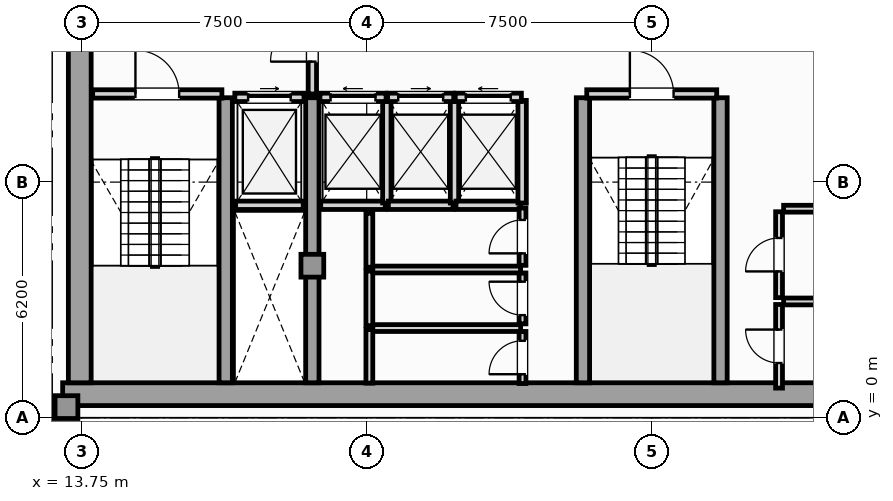
"""IFC4 building model, lengths in metres.
Left out: names, types, materials, properties, quantities, classifications, styles, units other than length and angle.
Written with IfcOpenShell. Run it as: python <this file> out.ifc"""

import sys

from ifc_helpers import new_model, si_unit, direction, frame, frame_2d, origin, origin_2d, place, context, subcontext, project, spatial, rectangle, extrude, element, fill, save


model = new_model("IFC4")
c1 = context("Model", 3, precision=1e-05, world=origin(), true_north=direction((0.0, 1.0)))
c2 = subcontext(c1, "Body", "Model", "MODEL_VIEW")
j1 = project(units=[si_unit("LENGTHUNIT", "METRE"), si_unit("PLANEANGLEUNIT", "RADIAN")], contexts=[c1])
p1 = place(None, origin())
s1 = spatial("IfcSite", under=j1, at=p1, CompositionType="ELEMENT")
p2 = place(p1, origin())
s2 = spatial("IfcBuilding", under=s1, at=p2, CompositionType="ELEMENT")
p3 = place(p2, frame((0.0, 0.0, 268.3)))
s3 = spatial("IfcBuildingStorey", under=s2, at=p3, CompositionType="ELEMENT", Elevation=268.3)
p4 = place(p3, frame((13.25, 0.62, 0.0), z_axis=(0.0, 0.0, 1.0), x_axis=(1.0, 0.0, 0.0)))
e1 = element("IfcWall", 1, at=p4, inside=s3, PredefinedType="SHEAR", context=c2, shape_type="SweptSolid", body=[
    extrude(rectangle(XDim=31.0, YDim=0.6, at=frame_2d((15.5, 0.0))), origin(), (0.0, 0.0, 1.0), 3.65),
])
p5 = place(p3, frame((13.7, 0.92, 0.0), z_axis=(0.0, 0.0, 1.0), x_axis=(0.0, 1.0, 0.0)))
e2 = element("IfcWall", 2, at=p5, inside=s3, PredefinedType="SHEAR", context=c2, shape_type="SweptSolid", body=[
    extrude(rectangle(XDim=10.53, YDim=0.6, at=frame_2d((5.265, 0.0))), origin(), (0.0, 0.0, 1.0), 3.65),
])
for number, where, z_axis, x_axis in (
    (3, (17.54, 0.92, 0.0), (0.0, 0.0, 1.0), (0.0, 1.0, 0.0)),
    (4, (19.82, 0.92, 0.0), (0.0, 0.0, 1.0), (0.0, 1.0, 0.0)),
    (5, (26.94, 0.92, 0.0), (0.0, 0.0, 1.0), (0.0, 1.0, 0.0)),
    (6, (30.56, 0.92, 0.0), (0.0, 0.0, 1.0), (0.0, 1.0, 0.0)),
):
    element("IfcWall", number, at=place(p3, frame(where, z_axis=z_axis, x_axis=x_axis)), inside=s3, PredefinedType="SHEAR", context=c2, shape_type="SweptSolid", body=[
        extrude(rectangle(XDim=7.5, YDim=0.35, at=frame_2d((3.75, 0.0))), origin(), (0.0, 0.0, 1.0), 3.65),
    ])
for number, where, z_axis, x_axis in (
    (7, (13.35, 0.28, 0.0), (0.0, 0.0, 1.0), (1.0, 0.0, 0.0)),
    (8, (19.82, 4.0, 0.0), (0.0, 0.0, 1.0), (1.0, 0.0, 0.0)),
):
    element("IfcColumn", number, at=place(p3, frame(where, z_axis=z_axis, x_axis=x_axis)), inside=s3, PredefinedType="COLUMN", context=c2, shape_type="SweptSolid", body=[
        extrude(rectangle(XDim=0.6, YDim=0.6, at=origin_2d()), origin(), (0.0, 0.0, 1.0), 3.85),
    ])
p6 = place(p3, frame((11.38, 0.18, 0.0), z_axis=(0.0, 0.0, 1.0), x_axis=(1.0, 0.0, 0.0)))
e9 = element("IfcWall", 9, at=p6, inside=s3, PredefinedType="SOLIDWALL", context=c2, shape_type="SweptSolid", body=[
    extrude(rectangle(XDim=1.87, YDim=0.26, at=frame_2d((0.935, 0.0))), origin(), (0.0, 0.0, 1.0), 3.65),
])
p7 = place(p3, frame((17.8, 5.59, 0.0), z_axis=(0.0, 0.0, 1.0), x_axis=(1.0, 0.0, 0.0)))
e10 = element("IfcWall", 10, at=p7, inside=s3, PredefinedType="SOLIDWALL", context=c2, shape_type="SweptSolid", body=[
    extrude(rectangle(XDim=1.78, YDim=0.22, at=frame_2d((0.89, 0.0))), origin(), (0.0, 0.0, 1.0), 3.65),
])
p8 = place(p3, frame((17.78, 8.43, 0.0), z_axis=(0.0, 0.0, 1.0), x_axis=(1.0, 0.0, 0.0)))
e11 = element("IfcWall", 11, at=p8, inside=s3, PredefinedType="SOLIDWALL", context=c2, shape_type="SweptSolid", body=[
    extrude(rectangle(XDim=1.82, YDim=0.22, at=frame_2d((0.91, 0.0))), origin(), (0.0, 0.0, 1.0), 3.65),
])
p9 = place(p8, frame((0.35, 0.0, 0.0)))
e12 = element("IfcOpeningElement", 12, at=p9, cuts=e11, PredefinedType="OPENING", context=c2, shape_type="SweptSolid", body=[
    extrude(rectangle(XDim=1.12, YDim=2.25, at=frame_2d((0.56, 1.125))), frame((0.0, 0.12, 0.0), z_axis=(0.0, -1.0, 0.0), x_axis=(1.0, 0.0, 0.0)), (0.0, 0.0, 1.0), 0.24),
])
p10 = place(p3, frame((20.04, 5.59, 0.0), z_axis=(0.0, 0.0, 1.0), x_axis=(1.0, 0.0, 0.0)))
e13 = element("IfcWall", 13, at=p10, inside=s3, PredefinedType="SOLIDWALL", context=c2, shape_type="SweptSolid", body=[
    extrude(rectangle(XDim=1.7, YDim=0.22, at=frame_2d((0.85, 0.0))), origin(), (0.0, 0.0, 1.0), 3.65),
])
p11 = place(p3, frame((21.78, 5.65, 0.0), z_axis=(0.0, 0.0, 1.0), x_axis=(0.0, 1.0, 0.0)))
e14 = element("IfcWall", 14, at=p11, inside=s3, PredefinedType="SOLIDWALL", context=c2, shape_type="SweptSolid", body=[
    extrude(rectangle(XDim=2.7, YDim=0.22, at=frame_2d((1.35, 0.0))), origin(), (0.0, 0.0, 1.0), 3.65),
])
p12 = place(p3, frame((20.02, 8.43, 0.0), z_axis=(0.0, 0.0, 1.0), x_axis=(1.0, 0.0, 0.0)))
e15 = element("IfcWall", 15, at=p12, inside=s3, PredefinedType="SOLIDWALL", context=c2, shape_type="SweptSolid", body=[
    extrude(rectangle(XDim=1.74, YDim=0.22, at=frame_2d((0.87, 0.0))), origin(), (0.0, 0.0, 1.0), 3.65),
])
p13 = place(p12, frame((0.28, 0.0, 0.0)))
e16 = element("IfcOpeningElement", 16, at=p13, cuts=e15, PredefinedType="OPENING", context=c2, shape_type="SweptSolid", body=[
    extrude(rectangle(XDim=1.18, YDim=2.2, at=frame_2d((0.59, 1.1))), frame((0.0, 0.12, 0.0), z_axis=(0.0, -1.0, 0.0), x_axis=(1.0, 0.0, 0.0)), (0.0, 0.0, 1.0), 0.24),
])
p14 = place(p3, frame((21.82, 5.59, 0.0), z_axis=(0.0, 0.0, 1.0), x_axis=(1.0, 0.0, 0.0)))
e17 = element("IfcWall", 17, at=p14, inside=s3, PredefinedType="SOLIDWALL", context=c2, shape_type="SweptSolid", body=[
    extrude(rectangle(XDim=1.7, YDim=0.22, at=frame_2d((0.85, 0.0))), origin(), (0.0, 0.0, 1.0), 3.65),
])
p15 = place(p3, frame((23.56, 5.65, 0.0), z_axis=(0.0, 0.0, 1.0), x_axis=(0.0, 1.0, 0.0)))
e18 = element("IfcWall", 18, at=p15, inside=s3, PredefinedType="SOLIDWALL", context=c2, shape_type="SweptSolid", body=[
    extrude(rectangle(XDim=2.7, YDim=0.22, at=frame_2d((1.35, 0.0))), origin(), (0.0, 0.0, 1.0), 3.65),
])
p16 = place(p3, frame((21.8, 8.43, 0.0), z_axis=(0.0, 0.0, 1.0), x_axis=(1.0, 0.0, 0.0)))
e19 = element("IfcWall", 19, at=p16, inside=s3, PredefinedType="SOLIDWALL", context=c2, shape_type="SweptSolid", body=[
    extrude(rectangle(XDim=1.74, YDim=0.22, at=frame_2d((0.87, 0.0))), origin(), (0.0, 0.0, 1.0), 3.65),
])
p17 = place(p16, frame((0.28, 0.0, 0.0)))
e20 = element("IfcOpeningElement", 20, at=p17, cuts=e19, PredefinedType="OPENING", context=c2, shape_type="SweptSolid", body=[
    extrude(rectangle(XDim=1.18, YDim=2.2, at=frame_2d((0.59, 1.1))), frame((0.0, 0.12, 0.0), z_axis=(0.0, -1.0, 0.0), x_axis=(1.0, 0.0, 0.0)), (0.0, 0.0, 1.0), 0.24),
])
p18 = place(p3, frame((23.6, 5.59, 0.0), z_axis=(0.0, 0.0, 1.0), x_axis=(1.0, 0.0, 0.0)))
e21 = element("IfcWall", 21, at=p18, inside=s3, PredefinedType="SOLIDWALL", context=c2, shape_type="SweptSolid", body=[
    extrude(rectangle(XDim=1.7, YDim=0.22, at=frame_2d((0.85, 0.0))), origin(), (0.0, 0.0, 1.0), 3.65),
])
p19 = place(p3, frame((25.34, 5.65, 0.0), z_axis=(0.0, 0.0, 1.0), x_axis=(0.0, 1.0, 0.0)))
e22 = element("IfcWall", 22, at=p19, inside=s3, PredefinedType="SOLIDWALL", context=c2, shape_type="SweptSolid", body=[
    extrude(rectangle(XDim=2.7, YDim=0.22, at=frame_2d((1.35, 0.0))), origin(), (0.0, 0.0, 1.0), 3.65),
])
p20 = place(p3, frame((23.58, 8.43, 0.0), z_axis=(0.0, 0.0, 1.0), x_axis=(1.0, 0.0, 0.0)))
e23 = element("IfcWall", 23, at=p20, inside=s3, PredefinedType="SOLIDWALL", context=c2, shape_type="SweptSolid", body=[
    extrude(rectangle(XDim=1.74, YDim=0.22, at=frame_2d((0.87, 0.0))), origin(), (0.0, 0.0, 1.0), 3.65),
])
p21 = place(p20, frame((0.28, 0.0, 0.0)))
e24 = element("IfcOpeningElement", 24, at=p21, cuts=e23, PredefinedType="OPENING", context=c2, shape_type="SweptSolid", body=[
    extrude(rectangle(XDim=1.18, YDim=2.2, at=frame_2d((0.59, 1.1))), frame((0.0, 0.12, 0.0), z_axis=(0.0, -1.0, 0.0), x_axis=(1.0, 0.0, 0.0)), (0.0, 0.0, 1.0), 0.24),
])
p22 = place(p3, frame((14.04, 8.52, 0.0), z_axis=(0.0, 0.0, 1.0), x_axis=(1.0, 0.0, 0.0)))
e25 = element("IfcWall", 25, at=p22, inside=s3, PredefinedType="SOLIDWALL", context=c2, shape_type="SweptSolid", body=[
    extrude(rectangle(XDim=3.4, YDim=0.22, at=frame_2d((1.7, 0.0))), origin(), (0.0, 0.0, 1.0), 3.65),
])
p23 = place(p22, frame((1.125, 0.0, 0.0)))
e26 = element("IfcOpeningElement", 26, at=p23, cuts=e25, PredefinedType="OPENING", context=c2, shape_type="SweptSolid", body=[
    extrude(rectangle(XDim=1.15, YDim=2.2, at=frame_2d((0.575, 1.1))), frame((0.0, 0.12, 0.0), z_axis=(0.0, -1.0, 0.0), x_axis=(1.0, 0.0, 0.0)), (0.0, 0.0, 1.0), 0.24),
])
p24 = place(p3, frame((27.04, 8.52, 0.0), z_axis=(0.0, 0.0, 1.0), x_axis=(1.0, 0.0, 0.0)))
e27 = element("IfcWall", 27, at=p24, inside=s3, PredefinedType="SOLIDWALL", context=c2, shape_type="SweptSolid", body=[
    extrude(rectangle(XDim=3.42, YDim=0.22, at=frame_2d((1.71, 0.0))), origin(), (0.0, 0.0, 1.0), 3.65),
])
p25 = place(p24, frame((1.135, 0.0, 0.0)))
e28 = element("IfcOpeningElement", 28, at=p25, cuts=e27, PredefinedType="OPENING", context=c2, shape_type="SweptSolid", body=[
    extrude(rectangle(XDim=1.15, YDim=2.2, at=frame_2d((0.575, 1.1))), frame((0.0, 0.12, 0.0), z_axis=(0.0, -1.0, 0.0), x_axis=(1.0, 0.0, 0.0)), (0.0, 0.0, 1.0), 0.24),
])
p26 = place(p3, frame((19.82, 8.52, 0.0), z_axis=(0.0, 0.0, 1.0), x_axis=(0.0, 1.0, 0.0)))
e29 = element("IfcWall", 29, at=p26, inside=s3, PredefinedType="SOLIDWALL", context=c2, shape_type="SweptSolid", body=[
    extrude(rectangle(XDim=2.8, YDim=0.22, at=frame_2d((1.4, 0.0))), origin(), (0.0, 0.0, 1.0), 3.105),
])
p27 = place(p26, frame((0.85, 0.0, 0.0)))
e30 = element("IfcOpeningElement", 30, at=p27, cuts=e29, PredefinedType="OPENING", context=c2, shape_type="SweptSolid", body=[
    extrude(rectangle(XDim=1.1, YDim=2.2, at=frame_2d((0.55, 1.1))), frame((0.0, 0.12, 0.0), z_axis=(0.0, -1.0, 0.0), x_axis=(1.0, 0.0, 0.0)), (0.0, 0.0, 1.0), 0.24),
])
p28 = place(p3, frame((25.35, 0.9, 0.0), z_axis=(0.0, 0.0, 1.0), x_axis=(0.0, 1.0, 0.0)))
e31 = element("IfcWall", 31, at=p28, inside=s3, PredefinedType="PARTITIONING", context=c2, shape_type="SweptSolid", body=[
    extrude(rectangle(XDim=1.37, YDim=0.18, at=frame_2d((0.685, 0.0))), origin(), (0.0, 0.0, 1.0), 3.65),
])
p29 = place(p28, frame((0.245, 0.0, 0.0)))
e32 = element("IfcOpeningElement", 32, at=p29, cuts=e31, PredefinedType="OPENING", context=c2, shape_type="SweptSolid", body=[
    extrude(rectangle(XDim=0.88, YDim=2.05, at=frame_2d((0.44, 1.025))), frame((0.0, 0.1, 0.0), z_axis=(0.0, -1.0, 0.0), x_axis=(1.0, 0.0, 0.0)), (0.0, 0.0, 1.0), 0.2),
])
p30 = place(p3, frame((21.36, 2.36, 0.0), z_axis=(0.0, 0.0, 1.0), x_axis=(1.0, 0.0, 0.0)))
e33 = element("IfcWall", 33, at=p30, inside=s3, PredefinedType="PARTITIONING", context=c2, shape_type="SweptSolid", body=[
    extrude(rectangle(XDim=3.94, YDim=0.18, at=frame_2d((1.97, 0.0))), origin(), (0.0, 0.0, 1.0), 3.65),
])
p31 = place(p3, frame((21.32, 0.91, 0.0), z_axis=(0.0, 0.0, 1.0), x_axis=(0.0, 1.0, 0.0)))
e34 = element("IfcWall", 34, at=p31, inside=s3, PredefinedType="PARTITIONING", context=c2, shape_type="SweptSolid", body=[
    extrude(rectangle(XDim=1.41, YDim=0.18, at=frame_2d((0.705, 0.0))), origin(), (0.0, 0.0, 1.0), 3.65),
])
p32 = place(p3, frame((25.35, 2.47, 0.0), z_axis=(0.0, 0.0, 1.0), x_axis=(0.0, 1.0, 0.0)))
e35 = element("IfcWall", 35, at=p32, inside=s3, PredefinedType="PARTITIONING", context=c2, shape_type="SweptSolid", body=[
    extrude(rectangle(XDim=1.34, YDim=0.18, at=frame_2d((0.67, 0.0))), origin(), (0.0, 0.0, 1.0), 3.65),
])
p33 = place(p32, frame((0.23, 0.0, 0.0)))
e36 = element("IfcOpeningElement", 36, at=p33, cuts=e35, PredefinedType="OPENING", context=c2, shape_type="SweptSolid", body=[
    extrude(rectangle(XDim=0.88, YDim=2.05, at=frame_2d((0.44, 1.025))), frame((0.0, 0.1, 0.0), z_axis=(0.0, -1.0, 0.0), x_axis=(1.0, 0.0, 0.0)), (0.0, 0.0, 1.0), 0.2),
])
p34 = place(p3, frame((21.36, 3.9, 0.0), z_axis=(0.0, 0.0, 1.0), x_axis=(1.0, 0.0, 0.0)))
e37 = element("IfcWall", 37, at=p34, inside=s3, PredefinedType="PARTITIONING", context=c2, shape_type="SweptSolid", body=[
    extrude(rectangle(XDim=3.94, YDim=0.18, at=frame_2d((1.97, 0.0))), origin(), (0.0, 0.0, 1.0), 3.65),
])
p35 = place(p3, frame((21.32, 2.42, 0.0), z_axis=(0.0, 0.0, 1.0), x_axis=(0.0, 1.0, 0.0)))
e38 = element("IfcWall", 38, at=p35, inside=s3, PredefinedType="PARTITIONING", context=c2, shape_type="SweptSolid", body=[
    extrude(rectangle(XDim=1.44, YDim=0.18, at=frame_2d((0.72, 0.0))), origin(), (0.0, 0.0, 1.0), 3.65),
])
p36 = place(p3, frame((25.35, 4.01, 0.0), z_axis=(0.0, 0.0, 1.0), x_axis=(0.0, 1.0, 0.0)))
e39 = element("IfcWall", 39, at=p36, inside=s3, PredefinedType="PARTITIONING", context=c2, shape_type="SweptSolid", body=[
    extrude(rectangle(XDim=1.51, YDim=0.18, at=frame_2d((0.755, 0.0))), origin(), (0.0, 0.0, 1.0), 3.65),
])
p37 = place(p36, frame((0.315, 0.0, 0.0)))
e40 = element("IfcOpeningElement", 40, at=p37, cuts=e39, PredefinedType="OPENING", context=c2, shape_type="SweptSolid", body=[
    extrude(rectangle(XDim=0.88, YDim=2.05, at=frame_2d((0.44, 1.025))), frame((0.0, 0.1, 0.0), z_axis=(0.0, -1.0, 0.0), x_axis=(1.0, 0.0, 0.0)), (0.0, 0.0, 1.0), 0.2),
])
p38 = place(p3, frame((21.32, 3.96, 0.0), z_axis=(0.0, 0.0, 1.0), x_axis=(0.0, 1.0, 0.0)))
e41 = element("IfcWall", 41, at=p38, inside=s3, PredefinedType="PARTITIONING", context=c2, shape_type="SweptSolid", body=[
    extrude(rectangle(XDim=1.42, YDim=0.18, at=frame_2d((0.71, 0.0))), origin(), (0.0, 0.0, 1.0), 3.65),
])
p39 = place(p3, frame((32.1, 0.78, 0.0), z_axis=(0.0, 0.0, 1.0), x_axis=(0.0, 1.0, 0.0)))
e42 = element("IfcWall", 42, at=p39, inside=s3, PredefinedType="PARTITIONING", context=c2, shape_type="SweptSolid", body=[
    extrude(rectangle(XDim=2.2, YDim=0.18, at=frame_2d((1.1, 0.0))), origin(), (0.0, 0.0, 1.0), 3.65),
])
p40 = place(p39, frame((0.66, 0.0, 0.0)))
e43 = element("IfcOpeningElement", 43, at=p40, cuts=e42, PredefinedType="OPENING", context=c2, shape_type="SweptSolid", body=[
    extrude(rectangle(XDim=0.88, YDim=2.05, at=frame_2d((0.44, 1.025))), frame((0.0, 0.1, 0.0), z_axis=(0.0, -1.0, 0.0), x_axis=(1.0, 0.0, 0.0)), (0.0, 0.0, 1.0), 0.2),
])
p41 = place(p3, frame((32.22, 3.06, 0.0), z_axis=(0.0, 0.0, 1.0), x_axis=(1.0, 0.0, 0.0)))
e44 = element("IfcWall", 44, at=p41, inside=s3, PredefinedType="PARTITIONING", context=c2, shape_type="SweptSolid", body=[
    extrude(rectangle(XDim=5.18, YDim=0.18, at=frame_2d((2.59, 0.0))), origin(), (0.0, 0.0, 1.0), 3.65),
])
p42 = place(p3, frame((32.1, 3.16, 0.0), z_axis=(0.0, 0.0, 1.0), x_axis=(0.0, 1.0, 0.0)))
e45 = element("IfcWall", 45, at=p42, inside=s3, PredefinedType="PARTITIONING", context=c2, shape_type="SweptSolid", body=[
    extrude(rectangle(XDim=2.26, YDim=0.18, at=frame_2d((1.13, 0.0))), origin(), (0.0, 0.0, 1.0), 3.65),
])
p43 = place(p42, frame((0.69, 0.0, 0.0)))
e46 = element("IfcOpeningElement", 46, at=p43, cuts=e45, PredefinedType="OPENING", context=c2, shape_type="SweptSolid", body=[
    extrude(rectangle(XDim=0.88, YDim=2.05, at=frame_2d((0.44, 1.025))), frame((0.0, 0.1, 0.0), z_axis=(0.0, -1.0, 0.0), x_axis=(1.0, 0.0, 0.0)), (0.0, 0.0, 1.0), 0.2),
])
p44 = place(p3, frame((32.22, 5.5, 0.0), z_axis=(0.0, 0.0, 1.0), x_axis=(1.0, 0.0, 0.0)))
e47 = element("IfcWall", 47, at=p44, inside=s3, PredefinedType="PARTITIONING", context=c2, shape_type="SweptSolid", body=[
    extrude(rectangle(XDim=2.9, YDim=0.18, at=frame_2d((1.45, 0.0))), origin(), (0.0, 0.0, 1.0), 3.65),
])
p45 = place(p9, origin())
e48 = element("IfcDoor", 48, at=p45, inside=s3, OperationType="SLIDING_TO_RIGHT", PredefinedType="DOOR", context=c2, shape_type="SweptSolid", body=[
    extrude(rectangle(XDim=1.12, YDim=2.25, at=frame_2d((0.56, 1.125))), frame((0.0, 0.025, 0.0), z_axis=(0.0, -1.0, 0.0), x_axis=(1.0, 0.0, 0.0)), (0.0, 0.0, 1.0), 0.05),
])
fill(e12, e48)
p46 = place(p13, origin())
e49 = element("IfcDoor", 49, at=p46, inside=s3, OperationType="SLIDING_TO_LEFT", PredefinedType="DOOR", context=c2, shape_type="SweptSolid", body=[
    extrude(rectangle(XDim=1.18, YDim=2.2, at=frame_2d((0.59, 1.1))), frame((0.0, 0.025, 0.0), z_axis=(0.0, -1.0, 0.0), x_axis=(1.0, 0.0, 0.0)), (0.0, 0.0, 1.0), 0.05),
])
fill(e16, e49)
p47 = place(p17, origin())
e50 = element("IfcDoor", 50, at=p47, inside=s3, OperationType="SLIDING_TO_RIGHT", PredefinedType="DOOR", context=c2, shape_type="SweptSolid", body=[
    extrude(rectangle(XDim=1.18, YDim=2.2, at=frame_2d((0.59, 1.1))), frame((0.0, 0.025, 0.0), z_axis=(0.0, -1.0, 0.0), x_axis=(1.0, 0.0, 0.0)), (0.0, 0.0, 1.0), 0.05),
])
fill(e20, e50)
p48 = place(p21, origin())
e51 = element("IfcDoor", 51, at=p48, inside=s3, OperationType="SLIDING_TO_LEFT", PredefinedType="DOOR", context=c2, shape_type="SweptSolid", body=[
    extrude(rectangle(XDim=1.18, YDim=2.2, at=frame_2d((0.59, 1.1))), frame((0.0, 0.025, 0.0), z_axis=(0.0, -1.0, 0.0), x_axis=(1.0, 0.0, 0.0)), (0.0, 0.0, 1.0), 0.05),
])
fill(e24, e51)
p49 = place(p23, origin())
e52 = element("IfcDoor", 52, at=p49, inside=s3, OperationType="SINGLE_SWING_LEFT", PredefinedType="DOOR", context=c2, shape_type="SweptSolid", body=[
    extrude(rectangle(XDim=1.15, YDim=2.2, at=frame_2d((0.575, 1.1))), frame((0.0, 0.025, 0.0), z_axis=(0.0, -1.0, 0.0), x_axis=(1.0, 0.0, 0.0)), (0.0, 0.0, 1.0), 0.05),
])
fill(e26, e52)
p50 = place(p25, origin())
e53 = element("IfcDoor", 53, at=p50, inside=s3, OperationType="SINGLE_SWING_LEFT", PredefinedType="DOOR", context=c2, shape_type="SweptSolid", body=[
    extrude(rectangle(XDim=1.15, YDim=2.2, at=frame_2d((0.575, 1.1))), frame((0.0, 0.025, 0.0), z_axis=(0.0, -1.0, 0.0), x_axis=(1.0, 0.0, 0.0)), (0.0, 0.0, 1.0), 0.05),
])
fill(e28, e53)
p51 = place(p27, origin())
e54 = element("IfcDoor", 54, at=p51, inside=s3, OperationType="SINGLE_SWING_LEFT", PredefinedType="DOOR", context=c2, shape_type="SweptSolid", body=[
    extrude(rectangle(XDim=1.1, YDim=2.2, at=frame_2d((0.55, 1.1))), frame((0.0, 0.025, 0.0), z_axis=(0.0, -1.0, 0.0), x_axis=(1.0, 0.0, 0.0)), (0.0, 0.0, 1.0), 0.05),
])
fill(e30, e54)
p52 = place(p29, origin())
e55 = element("IfcDoor", 55, at=p52, inside=s3, OperationType="SINGLE_SWING_LEFT", PredefinedType="DOOR", context=c2, shape_type="SweptSolid", body=[
    extrude(rectangle(XDim=0.88, YDim=2.05, at=frame_2d((0.44, 1.025))), frame((0.0, 0.025, 0.0), z_axis=(0.0, -1.0, 0.0), x_axis=(1.0, 0.0, 0.0)), (0.0, 0.0, 1.0), 0.05),
])
fill(e32, e55)
p53 = place(p33, origin())
e56 = element("IfcDoor", 56, at=p53, inside=s3, OperationType="SINGLE_SWING_RIGHT", PredefinedType="DOOR", context=c2, shape_type="SweptSolid", body=[
    extrude(rectangle(XDim=0.88, YDim=2.05, at=frame_2d((0.44, 1.025))), frame((0.0, 0.025, 0.0), z_axis=(0.0, -1.0, 0.0), x_axis=(1.0, 0.0, 0.0)), (0.0, 0.0, 1.0), 0.05),
])
fill(e36, e56)
p54 = place(p37, origin())
e57 = element("IfcDoor", 57, at=p54, inside=s3, OperationType="SINGLE_SWING_LEFT", PredefinedType="DOOR", context=c2, shape_type="SweptSolid", body=[
    extrude(rectangle(XDim=0.88, YDim=2.05, at=frame_2d((0.44, 1.025))), frame((0.0, 0.025, 0.0), z_axis=(0.0, -1.0, 0.0), x_axis=(1.0, 0.0, 0.0)), (0.0, 0.0, 1.0), 0.05),
])
fill(e40, e57)
p55 = place(p40, origin())
e58 = element("IfcDoor", 58, at=p55, inside=s3, OperationType="SINGLE_SWING_RIGHT", PredefinedType="DOOR", context=c2, shape_type="SweptSolid", body=[
    extrude(rectangle(XDim=0.88, YDim=2.05, at=frame_2d((0.44, 1.025))), frame((0.0, 0.025, 0.0), z_axis=(0.0, -1.0, 0.0), x_axis=(1.0, 0.0, 0.0)), (0.0, 0.0, 1.0), 0.05),
])
fill(e43, e58)
p56 = place(p43, origin())
e59 = element("IfcDoor", 59, at=p56, inside=s3, OperationType="SINGLE_SWING_LEFT", PredefinedType="DOOR", context=c2, shape_type="SweptSolid", body=[
    extrude(rectangle(XDim=0.88, YDim=2.05, at=frame_2d((0.44, 1.025))), frame((0.0, 0.025, 0.0), z_axis=(0.0, -1.0, 0.0), x_axis=(1.0, 0.0, 0.0)), (0.0, 0.0, 1.0), 0.05),
])
fill(e46, e59)
save(model, sys.argv[1])
